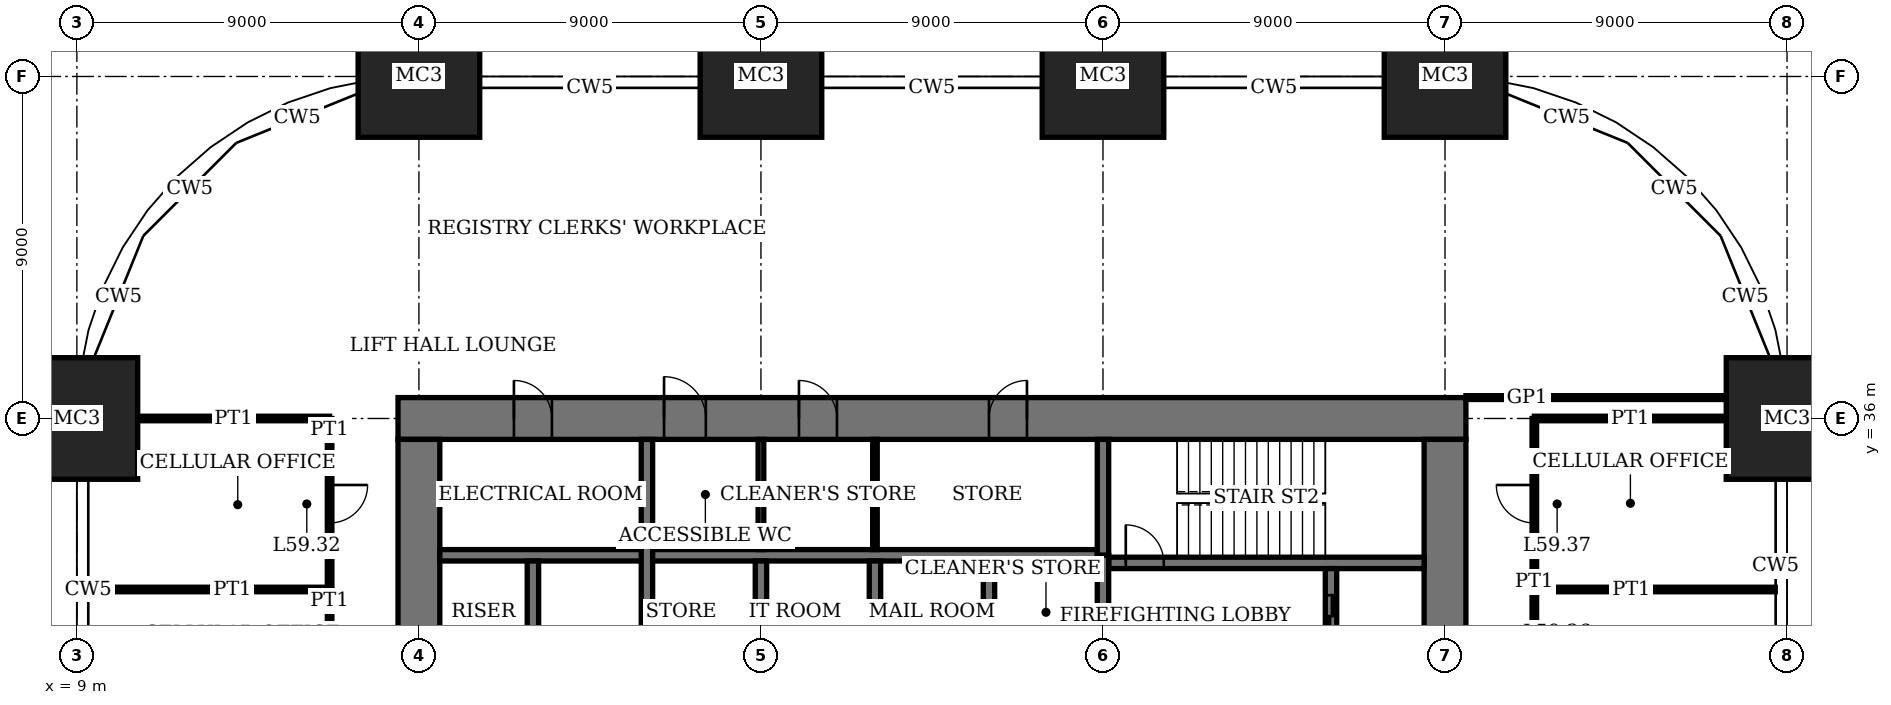
"""IFC4 building model, lengths in metres.
Left out: names, types, materials, properties, quantities, classifications, styles, units other than length and angle.
Written with IfcOpenShell. Run it as: python <this file> out.ifc"""

import sys

from ifc_helpers import new_model, si_unit, direction, frame, frame_2d, origin, origin_2d, place, context, subcontext, project, spatial, rectangle, extrude, element, fill, save


model = new_model("IFC4")
c1 = context("Model", 3, precision=1e-05, world=origin(), true_north=direction((0.0, 1.0)))
c2 = subcontext(c1, "Body", "Model", "MODEL_VIEW")
j1 = project(units=[si_unit("LENGTHUNIT", "METRE"), si_unit("PLANEANGLEUNIT", "RADIAN")], contexts=[c1])
p1 = place(None, origin())
s1 = spatial("IfcSite", under=j1, at=p1, CompositionType="ELEMENT")
p2 = place(p1, origin())
s2 = spatial("IfcBuilding", under=s1, at=p2, CompositionType="ELEMENT")
p3 = place(p2, frame((0.0, 0.0, 243.4)))
s3 = spatial("IfcBuildingStorey", under=s2, at=p3, CompositionType="ELEMENT", Elevation=243.4)
for number, where, z_axis, x_axis in (
    (1, (9.0, 36.0, 0.0), (0.0, 0.0, 1.0), (1.0, 0.0, 0.0)),
    (2, (18.0, 45.0, 0.0), (0.0, 0.0, 1.0), (1.0, 0.0, 0.0)),
    (3, (27.0, 45.0, 0.0), (0.0, 0.0, 1.0), (1.0, 0.0, 0.0)),
    (4, (36.0, 45.0, 0.0), (0.0, 0.0, 1.0), (1.0, 0.0, 0.0)),
    (5, (45.0, 45.0, 0.0), (0.0, 0.0, 1.0), (1.0, 0.0, 0.0)),
    (6, (54.0, 36.0, 0.0), (0.0, 0.0, 1.0), (1.0, 0.0, 0.0)),
):
    element("IfcColumn", number, at=place(p3, frame(where, z_axis=z_axis, x_axis=x_axis)), inside=s3, PredefinedType="COLUMN", context=c2, shape_type="SweptSolid", body=[
        extrude(rectangle(XDim=3.2, YDim=3.2, at=origin_2d()), origin(), (0.0, 0.0, 1.0), 4.0),
    ])
p4 = place(p3, frame((45.55, 36.0, 0.0), z_axis=(0.0, 0.0, 1.0), x_axis=(-1.0, 0.0, 0.0)))
e7 = element("IfcWall", 7, at=p4, inside=s3, PredefinedType="SHEAR", context=c2, shape_type="SweptSolid", body=[
    extrude(rectangle(XDim=28.1, YDim=1.1, at=frame_2d((14.05, 0.0))), origin(), (0.0, 0.0, 1.0), 4.0),
])
p5 = place(p4, frame((11.55, 0.0, 0.0)))
e8 = element("IfcOpeningElement", 8, at=p5, cuts=e7, PredefinedType="OPENING", context=c2, shape_type="SweptSolid", body=[
    extrude(rectangle(XDim=1.0, YDim=2.4, at=frame_2d((0.5, 1.2))), frame((0.0, 0.56, 0.0), z_axis=(0.0, -1.0, 0.0), x_axis=(1.0, 0.0, 0.0)), (0.0, 0.0, 1.0), 1.12),
])
p6 = place(p4, frame((16.55, 0.0, 0.0)))
e9 = element("IfcOpeningElement", 9, at=p6, cuts=e7, PredefinedType="OPENING", context=c2, shape_type="SweptSolid", body=[
    extrude(rectangle(XDim=1.0, YDim=2.4, at=frame_2d((0.5, 1.2))), frame((0.0, 0.56, 0.0), z_axis=(0.0, -1.0, 0.0), x_axis=(1.0, 0.0, 0.0)), (0.0, 0.0, 1.0), 1.12),
])
p7 = place(p4, frame((20.0, 0.0, 0.0)))
e10 = element("IfcOpeningElement", 10, at=p7, cuts=e7, PredefinedType="OPENING", context=c2, shape_type="SweptSolid", body=[
    extrude(rectangle(XDim=1.1, YDim=2.4, at=frame_2d((0.55, 1.2))), frame((0.0, 0.56, 0.0), z_axis=(0.0, -1.0, 0.0), x_axis=(1.0, 0.0, 0.0)), (0.0, 0.0, 1.0), 1.12),
])
p8 = place(p4, frame((24.05, 0.0, 0.0)))
e11 = element("IfcOpeningElement", 11, at=p8, cuts=e7, PredefinedType="OPENING", context=c2, shape_type="SweptSolid", body=[
    extrude(rectangle(XDim=1.0, YDim=2.4, at=frame_2d((0.5, 1.2))), frame((0.0, 0.56, 0.0), z_axis=(0.0, -1.0, 0.0), x_axis=(1.0, 0.0, 0.0)), (0.0, 0.0, 1.0), 1.12),
])
p9 = place(p3, frame((18.0, 35.45, 0.0), z_axis=(0.0, 0.0, 1.0), x_axis=(0.0, -1.0, 0.0)))
e12 = element("IfcWall", 12, at=p9, inside=s3, PredefinedType="SHEAR", context=c2, shape_type="SweptSolid", body=[
    extrude(rectangle(XDim=16.9, YDim=1.1, at=frame_2d((8.45, 0.0))), origin(), (0.0, 0.0, 1.0), 4.0),
])
p10 = place(p9, frame((8.45, 0.0, 0.0)))
e13 = element("IfcOpeningElement", 13, at=p10, cuts=e12, PredefinedType="OPENING", context=c2, shape_type="SweptSolid", body=[
    extrude(rectangle(XDim=1.8, YDim=2.4, at=frame_2d((0.9, 1.2))), frame((0.0, 0.56, 0.0), z_axis=(0.0, -1.0, 0.0), x_axis=(1.0, 0.0, 0.0)), (0.0, 0.0, 1.0), 1.12),
])
p11 = place(p3, frame((45.0, 18.55, 0.0), z_axis=(0.0, 0.0, 1.0), x_axis=(0.0, 1.0, 0.0)))
e14 = element("IfcWall", 14, at=p11, inside=s3, PredefinedType="SHEAR", context=c2, shape_type="SweptSolid", body=[
    extrude(rectangle(XDim=16.9, YDim=1.1, at=frame_2d((8.45, 0.0))), origin(), (0.0, 0.0, 1.0), 4.0),
])
p12 = place(p11, frame((8.45, 0.0, 0.0)))
e15 = element("IfcOpeningElement", 15, at=p12, cuts=e14, PredefinedType="OPENING", context=c2, shape_type="SweptSolid", body=[
    extrude(rectangle(XDim=1.8, YDim=2.4, at=frame_2d((0.9, 1.2))), frame((0.0, 0.56, 0.0), z_axis=(0.0, -1.0, 0.0), x_axis=(1.0, 0.0, 0.0)), (0.0, 0.0, 1.0), 1.12),
])
p13 = place(p3, frame((36.15, 32.2, 0.0), z_axis=(0.0, 0.0, 1.0), x_axis=(1.0, 0.0, 0.0)))
e16 = element("IfcWall", 16, at=p13, inside=s3, PredefinedType="SHEAR", context=c2, shape_type="SweptSolid", body=[
    extrude(rectangle(XDim=8.3, YDim=0.3, at=frame_2d((4.15, 0.0))), origin(), (0.0, 0.0, 1.0), 4.0),
])
p14 = place(p13, frame((0.45, 0.0, 0.0)))
e17 = element("IfcOpeningElement", 17, at=p14, cuts=e16, PredefinedType="OPENING", context=c2, shape_type="SweptSolid", body=[
    extrude(rectangle(XDim=1.0, YDim=2.4, at=frame_2d((0.5, 1.2))), frame((0.0, 0.16, 0.0), z_axis=(0.0, -1.0, 0.0), x_axis=(1.0, 0.0, 0.0)), (0.0, 0.0, 1.0), 0.32),
])
p15 = place(p3, frame((36.0, 32.4, 0.0), z_axis=(0.0, 0.0, 1.0), x_axis=(0.0, 1.0, 0.0)))
e18 = element("IfcWall", 18, at=p15, inside=s3, PredefinedType="SHEAR", context=c2, shape_type="SweptSolid", body=[
    extrude(rectangle(XDim=3.05, YDim=0.3, at=frame_2d((1.525, 0.0))), origin(), (0.0, 0.0, 1.0), 4.0),
])
p16 = place(p3, frame((42.0, 29.55, 0.0), z_axis=(0.0, 0.0, 1.0), x_axis=(0.0, 1.0, 0.0)))
e19 = element("IfcWall", 19, at=p16, inside=s3, PredefinedType="SHEAR", context=c2, shape_type="SweptSolid", body=[
    extrude(rectangle(XDim=2.5, YDim=0.3, at=frame_2d((1.25, 0.0))), origin(), (0.0, 0.0, 1.0), 4.0),
])
p17 = place(p16, frame((0.7, 0.0, 0.0)))
e20 = element("IfcOpeningElement", 20, at=p17, cuts=e19, PredefinedType="OPENING", context=c2, shape_type="SweptSolid", body=[
    extrude(rectangle(XDim=1.1, YDim=2.4, at=frame_2d((0.55, 1.2))), frame((0.0, 0.16, 0.0), z_axis=(0.0, -1.0, 0.0), x_axis=(1.0, 0.0, 0.0)), (0.0, 0.0, 1.0), 0.32),
])
p18 = place(p3, frame((18.55, 32.4, 0.0), z_axis=(0.0, 0.0, 1.0), x_axis=(1.0, 0.0, 0.0)))
e21 = element("IfcWall", 21, at=p18, inside=s3, PredefinedType="SHEAR", context=c2, shape_type="SweptSolid", body=[
    extrude(rectangle(XDim=17.3, YDim=0.3, at=frame_2d((8.65, 0.0))), origin(), (0.0, 0.0, 1.0), 4.0),
])
for number, where, z_axis, x_axis in (
    (22, (33.0, 29.55, 0.0), (0.0, 0.0, 1.0), (0.0, 1.0, 0.0)),
    (23, (30.0, 29.55, 0.0), (0.0, 0.0, 1.0), (0.0, 1.0, 0.0)),
    (24, (27.0, 29.55, 0.0), (0.0, 0.0, 1.0), (0.0, 1.0, 0.0)),
):
    element("IfcWall", number, at=place(p3, frame(where, z_axis=z_axis, x_axis=x_axis)), inside=s3, PredefinedType="SHEAR", context=c2, shape_type="SweptSolid", body=[
        extrude(rectangle(XDim=2.7, YDim=0.3, at=frame_2d((1.35, 0.0))), origin(), (0.0, 0.0, 1.0), 4.0),
    ])
p19 = place(p3, frame((24.0, 29.55, 0.0), z_axis=(0.0, 0.0, 1.0), x_axis=(0.0, 1.0, 0.0)))
e25 = element("IfcWall", 25, at=p19, inside=s3, PredefinedType="SHEAR", context=c2, shape_type="SweptSolid", body=[
    extrude(rectangle(XDim=5.9, YDim=0.3, at=frame_2d((2.95, 0.0))), origin(), (0.0, 0.0, 1.0), 4.0),
])
p20 = place(p3, frame((21.0, 29.55, 0.0), z_axis=(0.0, 0.0, 1.0), x_axis=(0.0, 1.0, 0.0)))
e26 = element("IfcWall", 26, at=p20, inside=s3, PredefinedType="SHEAR", context=c2, shape_type="SweptSolid", body=[
    extrude(rectangle(XDim=2.7, YDim=0.3, at=frame_2d((1.35, 0.0))), origin(), (0.0, 0.0, 1.0), 4.0),
])
p21 = place(p3, frame((36.0, 29.55, 0.0), z_axis=(0.0, 0.0, 1.0), x_axis=(0.0, 1.0, 0.0)))
e27 = element("IfcWall", 27, at=p21, inside=s3, PredefinedType="SHEAR", context=c2, shape_type="SweptSolid", body=[
    extrude(rectangle(XDim=2.85, YDim=0.3, at=frame_2d((1.425, 0.0))), origin(), (0.0, 0.0, 1.0), 4.0),
])
for number, where, z_axis, x_axis in (
    (28, (9.31, 31.5, 0.0), (0.0, 0.0, 1.0), (1.0, 0.0, 0.0)),
    (29, (47.35, 31.5, 0.0), (0.0, 0.0, 1.0), (1.0, 0.0, 0.0)),
):
    element("IfcWall", number, at=place(p3, frame(where, z_axis=z_axis, x_axis=x_axis)), inside=s3, PredefinedType="PARTITIONING", context=c2, shape_type="SweptSolid", body=[
        extrude(rectangle(XDim=6.34, YDim=0.12, at=frame_2d((3.17, 0.0))), origin(), (0.0, 0.0, 1.0), 3.1),
    ])
for number, where, z_axis, x_axis in (
    (30, (10.6, 36.0, 0.0), (0.0, 0.0, 1.0), (1.0, 0.0, 0.0)),
    (31, (47.35, 36.0, 0.0), (0.0, 0.0, 1.0), (1.0, 0.0, 0.0)),
):
    element("IfcWall", number, at=place(p3, frame(where, z_axis=z_axis, x_axis=x_axis)), inside=s3, PredefinedType="PARTITIONING", context=c2, shape_type="SweptSolid", body=[
        extrude(rectangle(XDim=5.05, YDim=0.12, at=frame_2d((2.525, 0.0))), origin(), (0.0, 0.0, 1.0), 3.05),
    ])
p22 = place(p3, frame((45.55, 36.55, 0.0), z_axis=(0.0, 0.0, 1.0), x_axis=(1.0, 0.0, 0.0)))
e32 = element("IfcWall", 32, at=p22, inside=s3, PredefinedType="PARTITIONING", context=c2, shape_type="SweptSolid", body=[
    extrude(rectangle(XDim=6.85, YDim=0.1, at=frame_2d((3.425, 0.0))), origin(), (0.0, 0.0, 1.0), 3.75),
])
p23 = place(p3, frame((15.65, 27.0, 0.0), z_axis=(0.0, 0.0, 1.0), x_axis=(0.0, 1.0, 0.0)))
e33 = element("IfcWall", 33, at=p23, inside=s3, PredefinedType="PARTITIONING", context=c2, shape_type="SweptSolid", body=[
    extrude(rectangle(XDim=4.5, YDim=0.12, at=frame_2d((2.25, 0.0))), origin(), (0.0, 0.0, 1.0), 3.75),
])
p24 = place(p23, frame((1.75, 0.0, 0.0)))
e34 = element("IfcOpeningElement", 34, at=p24, cuts=e33, PredefinedType="OPENING", context=c2, shape_type="SweptSolid", body=[
    extrude(rectangle(XDim=1.0, YDim=2.4, at=frame_2d((0.5, 1.2))), frame((0.0, 0.07, 0.0), z_axis=(0.0, -1.0, 0.0), x_axis=(1.0, 0.0, 0.0)), (0.0, 0.0, 1.0), 0.14),
])
p25 = place(p3, frame((15.65, 31.5, 0.0), z_axis=(0.0, 0.0, 1.0), x_axis=(0.0, 1.0, 0.0)))
e35 = element("IfcWall", 35, at=p25, inside=s3, PredefinedType="PARTITIONING", context=c2, shape_type="SweptSolid", body=[
    extrude(rectangle(XDim=4.5, YDim=0.12, at=frame_2d((2.25, 0.0))), origin(), (0.0, 0.0, 1.0), 3.75),
])
p26 = place(p25, frame((1.75, 0.0, 0.0)))
e36 = element("IfcOpeningElement", 36, at=p26, cuts=e35, PredefinedType="OPENING", context=c2, shape_type="SweptSolid", body=[
    extrude(rectangle(XDim=1.0, YDim=2.4, at=frame_2d((0.5, 1.2))), frame((0.0, 0.07, 0.0), z_axis=(0.0, -1.0, 0.0), x_axis=(1.0, 0.0, 0.0)), (0.0, 0.0, 1.0), 0.14),
])
p27 = place(p3, frame((47.35, 27.0, 0.0), z_axis=(0.0, 0.0, 1.0), x_axis=(0.0, 1.0, 0.0)))
e37 = element("IfcWall", 37, at=p27, inside=s3, PredefinedType="PARTITIONING", context=c2, shape_type="SweptSolid", body=[
    extrude(rectangle(XDim=4.5, YDim=0.12, at=frame_2d((2.25, 0.0))), origin(), (0.0, 0.0, 1.0), 3.75),
])
p28 = place(p27, frame((1.75, 0.0, 0.0)))
e38 = element("IfcOpeningElement", 38, at=p28, cuts=e37, PredefinedType="OPENING", context=c2, shape_type="SweptSolid", body=[
    extrude(rectangle(XDim=1.0, YDim=2.4, at=frame_2d((0.5, 1.2))), frame((0.0, 0.07, 0.0), z_axis=(0.0, -1.0, 0.0), x_axis=(1.0, 0.0, 0.0)), (0.0, 0.0, 1.0), 0.14),
])
p29 = place(p3, frame((47.35, 31.5, 0.0), z_axis=(0.0, 0.0, 1.0), x_axis=(0.0, 1.0, 0.0)))
e39 = element("IfcWall", 39, at=p29, inside=s3, PredefinedType="PARTITIONING", context=c2, shape_type="SweptSolid", body=[
    extrude(rectangle(XDim=4.5, YDim=0.12, at=frame_2d((2.25, 0.0))), origin(), (0.0, 0.0, 1.0), 3.75),
])
p30 = place(p29, frame((1.75, 0.0, 0.0)))
e40 = element("IfcOpeningElement", 40, at=p30, cuts=e39, PredefinedType="OPENING", context=c2, shape_type="SweptSolid", body=[
    extrude(rectangle(XDim=1.0, YDim=2.4, at=frame_2d((0.5, 1.2))), frame((0.0, 0.07, 0.0), z_axis=(0.0, -1.0, 0.0), x_axis=(1.0, 0.0, 0.0)), (0.0, 0.0, 1.0), 0.14),
])
p31 = place(p3, frame((30.0, 32.55, 0.0), z_axis=(0.0, 0.0, 1.0), x_axis=(0.0, 1.0, 0.0)))
e41 = element("IfcWall", 41, at=p31, inside=s3, PredefinedType="PARTITIONING", context=c2, shape_type="SweptSolid", body=[
    extrude(rectangle(XDim=2.9, YDim=0.12, at=frame_2d((1.45, 0.0))), origin(), (0.0, 0.0, 1.0), 3.75),
])
p32 = place(p3, frame((27.0, 32.55, 0.0), z_axis=(0.0, 0.0, 1.0), x_axis=(0.0, 1.0, 0.0)))
e42 = element("IfcWall", 42, at=p32, inside=s3, PredefinedType="PARTITIONING", context=c2, shape_type="SweptSolid", body=[
    extrude(rectangle(XDim=2.9, YDim=0.15, at=frame_2d((1.45, 0.0))), origin(), (0.0, 0.0, 1.0), 3.75),
])
p33 = place(p5, origin())
e43 = element("IfcDoor", 43, at=p33, inside=s3, OperationType="SINGLE_SWING_LEFT", PredefinedType="DOOR", context=c2, shape_type="SweptSolid", body=[
    extrude(rectangle(XDim=1.0, YDim=2.4, at=frame_2d((0.5, 1.2))), frame((0.0, 0.025, 0.0), z_axis=(0.0, -1.0, 0.0), x_axis=(1.0, 0.0, 0.0)), (0.0, 0.0, 1.0), 0.05),
    extrude(rectangle(XDim=0.04, YDim=2.4, at=frame_2d((0.02, 1.2))), frame((0.0, 0.4, 0.0), z_axis=(0.0, -1.0, 0.0), x_axis=(1.0, 0.0, 0.0)), (0.0, 0.0, 1.0), 0.8),
    extrude(rectangle(XDim=0.04, YDim=2.4, at=frame_2d((0.98, 1.2))), frame((0.0, 0.4, 0.0), z_axis=(0.0, -1.0, 0.0), x_axis=(1.0, 0.0, 0.0)), (0.0, 0.0, 1.0), 0.8),
    extrude(rectangle(XDim=1.0, YDim=0.04, at=frame_2d((0.5, 2.38))), frame((0.0, 0.4, 0.0), z_axis=(0.0, -1.0, 0.0), x_axis=(1.0, 0.0, 0.0)), (0.0, 0.0, 1.0), 0.8),
])
fill(e8, e43)
p34 = place(p6, origin())
e44 = element("IfcDoor", 44, at=p34, inside=s3, OperationType="SINGLE_SWING_RIGHT", PredefinedType="DOOR", context=c2, shape_type="SweptSolid", body=[
    extrude(rectangle(XDim=1.0, YDim=2.4, at=frame_2d((0.5, 1.2))), frame((0.0, 0.025, 0.0), z_axis=(0.0, -1.0, 0.0), x_axis=(1.0, 0.0, 0.0)), (0.0, 0.0, 1.0), 0.05),
    extrude(rectangle(XDim=0.04, YDim=2.4, at=frame_2d((0.02, 1.2))), frame((0.0, 0.4, 0.0), z_axis=(0.0, -1.0, 0.0), x_axis=(1.0, 0.0, 0.0)), (0.0, 0.0, 1.0), 0.8),
    extrude(rectangle(XDim=0.04, YDim=2.4, at=frame_2d((0.98, 1.2))), frame((0.0, 0.4, 0.0), z_axis=(0.0, -1.0, 0.0), x_axis=(1.0, 0.0, 0.0)), (0.0, 0.0, 1.0), 0.8),
    extrude(rectangle(XDim=1.0, YDim=0.04, at=frame_2d((0.5, 2.38))), frame((0.0, 0.4, 0.0), z_axis=(0.0, -1.0, 0.0), x_axis=(1.0, 0.0, 0.0)), (0.0, 0.0, 1.0), 0.8),
])
fill(e9, e44)
p35 = place(p7, origin())
e45 = element("IfcDoor", 45, at=p35, inside=s3, OperationType="SINGLE_SWING_RIGHT", PredefinedType="DOOR", context=c2, shape_type="SweptSolid", body=[
    extrude(rectangle(XDim=1.1, YDim=2.4, at=frame_2d((0.55, 1.2))), frame((0.0, 0.025, 0.0), z_axis=(0.0, -1.0, 0.0), x_axis=(1.0, 0.0, 0.0)), (0.0, 0.0, 1.0), 0.05),
    extrude(rectangle(XDim=0.04, YDim=2.4, at=frame_2d((0.02, 1.2))), frame((0.0, 0.44, 0.0), z_axis=(0.0, -1.0, 0.0), x_axis=(1.0, 0.0, 0.0)), (0.0, 0.0, 1.0), 0.88),
    extrude(rectangle(XDim=0.04, YDim=2.4, at=frame_2d((1.08, 1.2))), frame((0.0, 0.44, 0.0), z_axis=(0.0, -1.0, 0.0), x_axis=(1.0, 0.0, 0.0)), (0.0, 0.0, 1.0), 0.88),
    extrude(rectangle(XDim=1.1, YDim=0.04, at=frame_2d((0.55, 2.38))), frame((0.0, 0.44, 0.0), z_axis=(0.0, -1.0, 0.0), x_axis=(1.0, 0.0, 0.0)), (0.0, 0.0, 1.0), 0.88),
])
fill(e10, e45)
p36 = place(p8, origin())
e46 = element("IfcDoor", 46, at=p36, inside=s3, OperationType="SINGLE_SWING_RIGHT", PredefinedType="DOOR", context=c2, shape_type="SweptSolid", body=[
    extrude(rectangle(XDim=1.0, YDim=2.4, at=frame_2d((0.5, 1.2))), frame((0.0, 0.025, 0.0), z_axis=(0.0, -1.0, 0.0), x_axis=(1.0, 0.0, 0.0)), (0.0, 0.0, 1.0), 0.05),
    extrude(rectangle(XDim=0.04, YDim=2.4, at=frame_2d((0.02, 1.2))), frame((0.0, 0.4, 0.0), z_axis=(0.0, -1.0, 0.0), x_axis=(1.0, 0.0, 0.0)), (0.0, 0.0, 1.0), 0.8),
    extrude(rectangle(XDim=0.04, YDim=2.4, at=frame_2d((0.98, 1.2))), frame((0.0, 0.4, 0.0), z_axis=(0.0, -1.0, 0.0), x_axis=(1.0, 0.0, 0.0)), (0.0, 0.0, 1.0), 0.8),
    extrude(rectangle(XDim=1.0, YDim=0.04, at=frame_2d((0.5, 2.38))), frame((0.0, 0.4, 0.0), z_axis=(0.0, -1.0, 0.0), x_axis=(1.0, 0.0, 0.0)), (0.0, 0.0, 1.0), 0.8),
])
fill(e11, e46)
p37 = place(p14, origin())
e47 = element("IfcDoor", 47, at=p37, inside=s3, OperationType="SINGLE_SWING_RIGHT", PredefinedType="DOOR", context=c2, shape_type="SweptSolid", body=[
    extrude(rectangle(XDim=1.0, YDim=2.4, at=frame_2d((0.5, 1.2))), frame((0.0, 0.03, 0.0), z_axis=(0.0, -1.0, 0.0), x_axis=(1.0, 0.0, 0.0)), (0.0, 0.0, 1.0), 0.06),
])
fill(e17, e47)
p38 = place(p26, origin())
e48 = element("IfcDoor", 48, at=p38, inside=s3, OperationType="SINGLE_SWING_RIGHT", PredefinedType="DOOR", context=c2, shape_type="SweptSolid", body=[
    extrude(rectangle(XDim=1.0, YDim=2.4, at=frame_2d((0.5, 1.2))), frame((0.0, 0.025, 0.0), z_axis=(0.0, -1.0, 0.0), x_axis=(1.0, 0.0, 0.0)), (0.0, 0.0, 1.0), 0.05),
])
fill(e36, e48)
p39 = place(p30, origin())
e49 = element("IfcDoor", 49, at=p39, inside=s3, OperationType="SINGLE_SWING_LEFT", PredefinedType="DOOR", context=c2, shape_type="SweptSolid", body=[
    extrude(rectangle(XDim=1.0, YDim=2.4, at=frame_2d((0.5, 1.2))), frame((0.0, 0.025, 0.0), z_axis=(0.0, -1.0, 0.0), x_axis=(1.0, 0.0, 0.0)), (0.0, 0.0, 1.0), 0.05),
])
fill(e40, e49)
p40 = place(p17, origin())
e50 = element("IfcDoor", 50, at=p40, inside=s3, OperationType="DOUBLE_DOOR_SLIDING", PredefinedType="DOOR", context=c2, shape_type="SweptSolid", body=[
    extrude(rectangle(XDim=1.1, YDim=2.4, at=frame_2d((0.55, 1.2))), frame((0.0, 0.03, 0.0), z_axis=(0.0, -1.0, 0.0), x_axis=(1.0, 0.0, 0.0)), (0.0, 0.0, 1.0), 0.06),
])
fill(e20, e50)
save(model, sys.argv[1])
